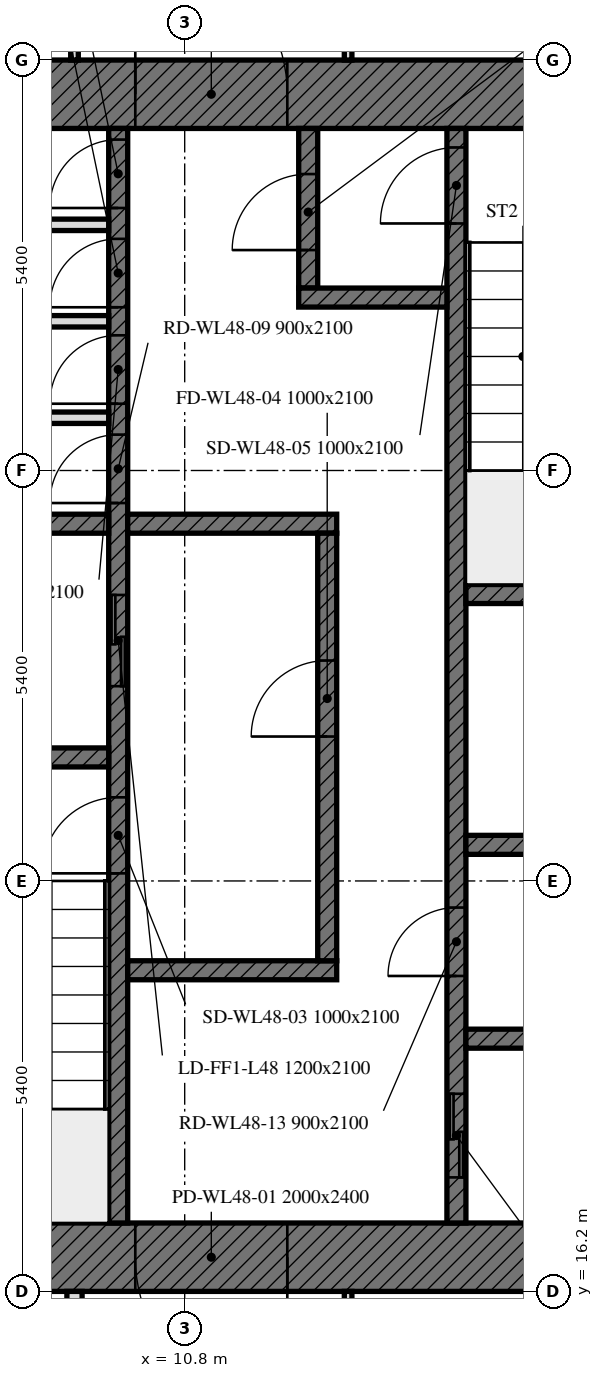
"""IFC4 building model, lengths in metres.
Left out: names, types, materials, properties, quantities, classifications, styles, units other than length and angle.
Written with IfcOpenShell. Run it as: python <this file> out.ifc"""

import sys

from ifc_helpers import new_model, si_unit, direction, frame, frame_2d, origin, place, context, subcontext, project, spatial, rectangle, extrude, element, fill, save


model = new_model("IFC4")
c1 = context("Model", 3, precision=1e-05, world=origin(), true_north=direction((0.0, 1.0)))
c2 = subcontext(c1, "Body", "Model", "MODEL_VIEW")
j1 = project(units=[si_unit("LENGTHUNIT", "METRE"), si_unit("PLANEANGLEUNIT", "RADIAN")], contexts=[c1])
p1 = place(None, origin())
s1 = spatial("IfcSite", under=j1, at=p1, CompositionType="ELEMENT")
p2 = place(p1, origin())
s2 = spatial("IfcBuilding", under=s1, at=p2, CompositionType="ELEMENT")
p3 = place(p2, frame((0.0, 0.0, 197.2)))
s3 = spatial("IfcBuildingStorey", under=s2, at=p3, CompositionType="ELEMENT", Elevation=197.2)
p4 = place(p3, frame((17.7, 16.65, 0.0), z_axis=(0.0, 0.0, 1.0), x_axis=(-1.0, 0.0, 0.0)))
e1 = element("IfcWall", 1, at=p4, inside=s3, PredefinedType="SOLIDWALL", context=c2, shape_type="SweptSolid", body=[
    extrude(rectangle(XDim=11.1, YDim=0.9, at=frame_2d((5.55, 0.0))), origin(), (0.0, 0.0, 1.0), 3.0),
])
p5 = place(p4, frame((5.55, 0.0, 0.0)))
e2 = element("IfcOpeningElement", 2, at=p5, cuts=e1, PredefinedType="OPENING", context=c2, shape_type="SweptSolid", body=[
    extrude(rectangle(XDim=2.0, YDim=2.4, at=frame_2d((1.0, 1.2))), frame((0.0, 0.45, 0.0), z_axis=(0.0, -1.0, 0.0), x_axis=(1.0, 0.0, 0.0)), (0.0, 0.0, 1.0), 0.9),
])
p6 = place(p3, frame((6.6, 31.95, 0.0), z_axis=(0.0, 0.0, 1.0), x_axis=(1.0, 0.0, 0.0)))
e3 = element("IfcWall", 3, at=p6, inside=s3, PredefinedType="SOLIDWALL", context=c2, shape_type="SweptSolid", body=[
    extrude(rectangle(XDim=11.1, YDim=0.9, at=frame_2d((5.55, 0.0))), origin(), (0.0, 0.0, 1.0), 3.0),
])
p7 = place(p6, frame((3.55, 0.0, 0.0)))
e4 = element("IfcOpeningElement", 4, at=p7, cuts=e3, PredefinedType="OPENING", context=c2, shape_type="SweptSolid", body=[
    extrude(rectangle(XDim=2.0, YDim=2.4, at=frame_2d((1.0, 1.2))), frame((0.0, 0.45, 0.0), z_axis=(0.0, -1.0, 0.0), x_axis=(1.0, 0.0, 0.0)), (0.0, 0.0, 1.0), 0.9),
])
p8 = place(p3, frame((9.925, 17.1, 0.0), z_axis=(0.0, 0.0, 1.0), x_axis=(0.0, 1.0, 0.0)))
e5 = element("IfcWall", 5, at=p8, inside=s3, PredefinedType="SOLIDWALL", context=c2, shape_type="SweptSolid", body=[
    extrude(rectangle(XDim=14.4, YDim=0.25, at=frame_2d((7.2, 0.0))), origin(), (0.0, 0.0, 1.0), 3.0),
])
p9 = place(p8, frame((4.6, 0.0, 0.0)))
e6 = element("IfcOpeningElement", 6, at=p9, cuts=e5, PredefinedType="OPENING", context=c2, shape_type="SweptSolid", body=[
    extrude(rectangle(XDim=1.0, YDim=2.1, at=frame_2d((0.5, 1.05))), frame((0.0, 0.125, 0.0), z_axis=(0.0, -1.0, 0.0), x_axis=(1.0, 0.0, 0.0)), (0.0, 0.0, 1.0), 0.25),
])
p10 = place(p8, frame((7.062, 0.0, 0.0)))
e7 = element("IfcOpeningElement", 7, at=p10, cuts=e5, PredefinedType="OPENING", context=c2, shape_type="SweptSolid", body=[
    extrude(rectangle(XDim=1.2, YDim=2.1, at=frame_2d((0.6, 1.05))), frame((0.0, 0.125, 0.0), z_axis=(0.0, -1.0, 0.0), x_axis=(1.0, 0.0, 0.0)), (0.0, 0.0, 1.0), 0.25),
])
p11 = place(p8, frame((9.472, 0.0, 0.0)))
e8 = element("IfcOpeningElement", 8, at=p11, cuts=e5, PredefinedType="OPENING", context=c2, shape_type="SweptSolid", body=[
    extrude(rectangle(XDim=0.9, YDim=2.1, at=frame_2d((0.45, 1.05))), frame((0.0, 0.125, 0.0), z_axis=(0.0, -1.0, 0.0), x_axis=(1.0, 0.0, 0.0)), (0.0, 0.0, 1.0), 0.25),
])
p12 = place(p8, frame((10.779, 0.0, 0.0)))
e9 = element("IfcOpeningElement", 9, at=p12, cuts=e5, PredefinedType="OPENING", context=c2, shape_type="SweptSolid", body=[
    extrude(rectangle(XDim=0.9, YDim=2.1, at=frame_2d((0.45, 1.05))), frame((0.0, 0.125, 0.0), z_axis=(0.0, -1.0, 0.0), x_axis=(1.0, 0.0, 0.0)), (0.0, 0.0, 1.0), 0.25),
])
p13 = place(p8, frame((12.048, 0.0, 0.0)))
e10 = element("IfcOpeningElement", 10, at=p13, cuts=e5, PredefinedType="OPENING", context=c2, shape_type="SweptSolid", body=[
    extrude(rectangle(XDim=0.9, YDim=2.1, at=frame_2d((0.45, 1.05))), frame((0.0, 0.125, 0.0), z_axis=(0.0, -1.0, 0.0), x_axis=(1.0, 0.0, 0.0)), (0.0, 0.0, 1.0), 0.25),
])
p14 = place(p8, frame((13.354, 0.0, 0.0)))
e11 = element("IfcOpeningElement", 11, at=p14, cuts=e5, PredefinedType="OPENING", context=c2, shape_type="SweptSolid", body=[
    extrude(rectangle(XDim=0.9, YDim=2.1, at=frame_2d((0.45, 1.05))), frame((0.0, 0.125, 0.0), z_axis=(0.0, -1.0, 0.0), x_axis=(1.0, 0.0, 0.0)), (0.0, 0.0, 1.0), 0.25),
])
p15 = place(p3, frame((14.375, 17.1, 0.0), z_axis=(0.0, 0.0, 1.0), x_axis=(0.0, 1.0, 0.0)))
e12 = element("IfcWall", 12, at=p15, inside=s3, PredefinedType="SOLIDWALL", context=c2, shape_type="SweptSolid", body=[
    extrude(rectangle(XDim=14.4, YDim=0.25, at=frame_2d((7.2, 0.0))), origin(), (0.0, 0.0, 1.0), 3.0),
])
p16 = place(p15, frame((13.15, 0.0, 0.0)))
e13 = element("IfcOpeningElement", 13, at=p16, cuts=e12, PredefinedType="OPENING", context=c2, shape_type="SweptSolid", body=[
    extrude(rectangle(XDim=1.0, YDim=2.1, at=frame_2d((0.5, 1.05))), frame((0.0, 0.125, 0.0), z_axis=(0.0, -1.0, 0.0), x_axis=(1.0, 0.0, 0.0)), (0.0, 0.0, 1.0), 0.25),
])
p17 = place(p15, frame((0.6, 0.0, 0.0)))
e14 = element("IfcOpeningElement", 14, at=p17, cuts=e12, PredefinedType="OPENING", context=c2, shape_type="SweptSolid", body=[
    extrude(rectangle(XDim=1.1, YDim=2.1, at=frame_2d((0.55, 1.05))), frame((0.0, 0.125, 0.0), z_axis=(0.0, -1.0, 0.0), x_axis=(1.0, 0.0, 0.0)), (0.0, 0.0, 1.0), 0.25),
])
p18 = place(p15, frame((3.25, 0.0, 0.0)))
e15 = element("IfcOpeningElement", 15, at=p18, cuts=e12, PredefinedType="OPENING", context=c2, shape_type="SweptSolid", body=[
    extrude(rectangle(XDim=0.9, YDim=2.1, at=frame_2d((0.45, 1.05))), frame((0.0, 0.125, 0.0), z_axis=(0.0, -1.0, 0.0), x_axis=(1.0, 0.0, 0.0)), (0.0, 0.0, 1.0), 0.25),
])
for number, where, z_axis, x_axis in (
    (16, (6.6, 23.225, 0.0), (0.0, 0.0, 1.0), (1.0, 0.0, 0.0)),
    (17, (14.5, 25.375, 0.0), (0.0, 0.0, 1.0), (1.0, 0.0, 0.0)),
    (18, (14.5, 22.075, 0.0), (0.0, 0.0, 1.0), (1.0, 0.0, 0.0)),
    (19, (6.6, 26.3, 0.0), (0.0, 0.0, 1.0), (1.0, 0.0, 0.0)),
):
    element("IfcWall", number, at=place(p3, frame(where, z_axis=z_axis, x_axis=x_axis)), inside=s3, PredefinedType="SOLIDWALL", context=c2, shape_type="SweptSolid", body=[
        extrude(rectangle(XDim=3.2, YDim=0.25, at=frame_2d((1.6, 0.0))), origin(), (0.0, 0.0, 1.0), 3.0),
    ])
for number, where, z_axis, x_axis in (
    (20, (10.05, 26.3, 0.0), (0.0, 0.0, 1.0), (1.0, 0.0, 0.0)),
    (21, (10.05, 20.425, 0.0), (0.0, 0.0, 1.0), (1.0, 0.0, 0.0)),
):
    element("IfcWall", number, at=place(p3, frame(where, z_axis=z_axis, x_axis=x_axis)), inside=s3, PredefinedType="SOLIDWALL", context=c2, shape_type="SweptSolid", body=[
        extrude(rectangle(XDim=2.75, YDim=0.25, at=frame_2d((1.375, 0.0))), origin(), (0.0, 0.0, 1.0), 3.0),
    ])
p19 = place(p3, frame((12.425, 29.4, 0.0), z_axis=(0.0, 0.0, 1.0), x_axis=(0.0, 1.0, 0.0)))
e22 = element("IfcWall", 22, at=p19, inside=s3, PredefinedType="SOLIDWALL", context=c2, shape_type="SweptSolid", body=[
    extrude(rectangle(XDim=2.1, YDim=0.25, at=frame_2d((1.05, 0.0))), origin(), (0.0, 0.0, 1.0), 3.0),
])
p20 = place(p19, frame((0.5, 0.0, 0.0)))
e23 = element("IfcOpeningElement", 23, at=p20, cuts=e22, PredefinedType="OPENING", context=c2, shape_type="SweptSolid", body=[
    extrude(rectangle(XDim=1.0, YDim=2.1, at=frame_2d((0.5, 1.05))), frame((0.0, 0.125, 0.0), z_axis=(0.0, -1.0, 0.0), x_axis=(1.0, 0.0, 0.0)), (0.0, 0.0, 1.0), 0.25),
])
p21 = place(p3, frame((12.3, 29.275, 0.0), z_axis=(0.0, 0.0, 1.0), x_axis=(1.0, 0.0, 0.0)))
e24 = element("IfcWall", 24, at=p21, inside=s3, PredefinedType="SOLIDWALL", context=c2, shape_type="SweptSolid", body=[
    extrude(rectangle(XDim=1.95, YDim=0.25, at=frame_2d((0.975, 0.0))), origin(), (0.0, 0.0, 1.0), 3.0),
])
p22 = place(p3, frame((12.675, 20.55, 0.0), z_axis=(0.0, 0.0, 1.0), x_axis=(0.0, 1.0, 0.0)))
e25 = element("IfcWall", 25, at=p22, inside=s3, PredefinedType="SOLIDWALL", context=c2, shape_type="SweptSolid", body=[
    extrude(rectangle(XDim=5.625, YDim=0.25, at=frame_2d((2.812, 0.0))), origin(), (0.0, 0.0, 1.0), 3.0),
])
p23 = place(p22, frame((2.95, 0.0, 0.0)))
e26 = element("IfcOpeningElement", 26, at=p23, cuts=e25, PredefinedType="OPENING", context=c2, shape_type="SweptSolid", body=[
    extrude(rectangle(XDim=1.0, YDim=2.1, at=frame_2d((0.5, 1.05))), frame((0.0, 0.125, 0.0), z_axis=(0.0, -1.0, 0.0), x_axis=(1.0, 0.0, 0.0)), (0.0, 0.0, 1.0), 0.25),
])
p24 = place(p3, frame((14.5, 19.525, 0.0), z_axis=(0.0, 0.0, 1.0), x_axis=(1.0, 0.0, 0.0)))
e27 = element("IfcWall", 27, at=p24, inside=s3, PredefinedType="SOLIDWALL", context=c2, shape_type="SweptSolid", body=[
    extrude(rectangle(XDim=3.2, YDim=0.25, at=frame_2d((1.6, 0.0))), origin(), (0.0, 0.0, 1.0), 3.0),
])
for number, where, z_axis, x_axis in (
    (28, (6.6, 27.694, 0.0), (0.0, 0.0, 1.0), (1.0, 0.0, 0.0)),
    (29, (6.6, 28.963, 0.0), (0.0, 0.0, 1.0), (1.0, 0.0, 0.0)),
    (30, (6.6, 30.232, 0.0), (0.0, 0.0, 1.0), (1.0, 0.0, 0.0)),
):
    element("IfcWall", number, at=place(p3, frame(where, z_axis=z_axis, x_axis=x_axis)), inside=s3, PredefinedType="PARTITIONING", context=c2, shape_type="SweptSolid", body=[
        extrude(rectangle(XDim=3.2, YDim=0.15, at=frame_2d((1.6, 0.0))), origin(), (0.0, 0.0, 1.0), 3.0),
    ])
for number, where, z_axis, x_axis in (
    (31, (9.35, 39.525, 0.0), (0.0, 0.0, 1.0), (0.0, -1.0, 0.0)),
    (32, (12.95, 32.4, 0.0), (0.0, 0.0, 1.0), (0.0, 1.0, 0.0)),
):
    element("IfcWall", number, at=place(p3, frame(where, z_axis=z_axis, x_axis=x_axis)), inside=s3, PredefinedType="PARTITIONING", context=c2, shape_type="SweptSolid", body=[
        extrude(rectangle(XDim=7.125, YDim=0.1, at=frame_2d((3.562, 0.0))), origin(), (0.0, 0.0, 1.0), 3.0),
    ])
p25 = place(p3, frame((9.35, 16.2, 0.0), z_axis=(0.0, 0.0, 1.0), x_axis=(0.0, -1.0, 0.0)))
e33 = element("IfcWall", 33, at=p25, inside=s3, PredefinedType="PARTITIONING", context=c2, shape_type="SweptSolid", body=[
    extrude(rectangle(XDim=2.8, YDim=0.2, at=frame_2d((1.4, 0.0))), origin(), (0.0, 0.0, 1.0), 3.0),
])
p26 = place(p3, frame((12.95, 13.575, 0.0), z_axis=(0.0, 0.0, 1.0), x_axis=(0.0, 1.0, 0.0)))
e34 = element("IfcWall", 34, at=p26, inside=s3, PredefinedType="PARTITIONING", context=c2, shape_type="SweptSolid", body=[
    extrude(rectangle(XDim=2.625, YDim=0.1, at=frame_2d((1.312, 0.0))), origin(), (0.0, 0.0, 1.0), 3.0),
])
p27 = place(p5, origin())
e35 = element("IfcDoor", 35, at=p27, inside=s3, OperationType="DOUBLE_DOOR_SINGLE_SWING", PredefinedType="DOOR", context=c2, shape_type="SweptSolid", body=[
    extrude(rectangle(XDim=2.0, YDim=2.4, at=frame_2d((1.0, 1.2))), frame((0.0, 0.025, 0.0), z_axis=(0.0, -1.0, 0.0), x_axis=(1.0, 0.0, 0.0)), (0.0, 0.0, 1.0), 0.05),
])
fill(e2, e35)
p28 = place(p7, origin())
e36 = element("IfcDoor", 36, at=p28, inside=s3, OperationType="DOUBLE_DOOR_SINGLE_SWING", PredefinedType="DOOR", context=c2, shape_type="SweptSolid", body=[
    extrude(rectangle(XDim=2.0, YDim=2.4, at=frame_2d((1.0, 1.2))), frame((0.0, 0.025, 0.0), z_axis=(0.0, -1.0, 0.0), x_axis=(1.0, 0.0, 0.0)), (0.0, 0.0, 1.0), 0.05),
])
fill(e4, e36)
p29 = place(p9, origin())
e37 = element("IfcDoor", 37, at=p29, inside=s3, OperationType="SINGLE_SWING_LEFT", PredefinedType="DOOR", context=c2, shape_type="SweptSolid", body=[
    extrude(rectangle(XDim=1.0, YDim=2.1, at=frame_2d((0.5, 1.05))), frame((0.0, 0.025, 0.0), z_axis=(0.0, -1.0, 0.0), x_axis=(1.0, 0.0, 0.0)), (0.0, 0.0, 1.0), 0.05),
])
fill(e6, e37)
p30 = place(p23, origin())
e38 = element("IfcDoor", 38, at=p30, inside=s3, OperationType="SINGLE_SWING_LEFT", PredefinedType="DOOR", context=c2, shape_type="SweptSolid", body=[
    extrude(rectangle(XDim=1.0, YDim=2.1, at=frame_2d((0.5, 1.05))), frame((0.0, 0.025, 0.0), z_axis=(0.0, -1.0, 0.0), x_axis=(1.0, 0.0, 0.0)), (0.0, 0.0, 1.0), 0.05),
])
fill(e26, e38)
p31 = place(p16, origin())
e39 = element("IfcDoor", 39, at=p31, inside=s3, OperationType="SINGLE_SWING_LEFT", PredefinedType="DOOR", context=c2, shape_type="SweptSolid", body=[
    extrude(rectangle(XDim=1.0, YDim=2.1, at=frame_2d((0.5, 1.05))), frame((0.0, 0.025, 0.0), z_axis=(0.0, -1.0, 0.0), x_axis=(1.0, 0.0, 0.0)), (0.0, 0.0, 1.0), 0.05),
])
fill(e13, e39)
p32 = place(p20, origin())
e40 = element("IfcDoor", 40, at=p32, inside=s3, OperationType="SINGLE_SWING_LEFT", PredefinedType="DOOR", context=c2, shape_type="SweptSolid", body=[
    extrude(rectangle(XDim=1.0, YDim=2.1, at=frame_2d((0.5, 1.05))), frame((0.0, 0.025, 0.0), z_axis=(0.0, -1.0, 0.0), x_axis=(1.0, 0.0, 0.0)), (0.0, 0.0, 1.0), 0.05),
])
fill(e23, e40)
p33 = place(p10, origin())
e41 = element("IfcDoor", 41, at=p33, inside=s3, OperationType="DOUBLE_DOOR_SLIDING", PredefinedType="DOOR", context=c2, shape_type="SweptSolid", body=[
    extrude(rectangle(XDim=1.2, YDim=2.1, at=frame_2d((0.6, 1.05))), frame((0.0, 0.025, 0.0), z_axis=(0.0, -1.0, 0.0), x_axis=(1.0, 0.0, 0.0)), (0.0, 0.0, 1.0), 0.05),
])
fill(e7, e41)
p34 = place(p17, origin())
e42 = element("IfcDoor", 42, at=p34, inside=s3, OperationType="DOUBLE_DOOR_SLIDING", PredefinedType="DOOR", context=c2, shape_type="SweptSolid", body=[
    extrude(rectangle(XDim=1.1, YDim=2.1, at=frame_2d((0.55, 1.05))), frame((0.0, 0.025, 0.0), z_axis=(0.0, -1.0, 0.0), x_axis=(1.0, 0.0, 0.0)), (0.0, 0.0, 1.0), 0.05),
])
fill(e14, e42)
p35 = place(p11, origin())
e43 = element("IfcDoor", 43, at=p35, inside=s3, OperationType="SINGLE_SWING_LEFT", PredefinedType="DOOR", context=c2, shape_type="SweptSolid", body=[
    extrude(rectangle(XDim=0.9, YDim=2.1, at=frame_2d((0.45, 1.05))), frame((0.0, 0.025, 0.0), z_axis=(0.0, -1.0, 0.0), x_axis=(1.0, 0.0, 0.0)), (0.0, 0.0, 1.0), 0.05),
])
fill(e8, e43)
p36 = place(p12, origin())
e44 = element("IfcDoor", 44, at=p36, inside=s3, OperationType="SINGLE_SWING_LEFT", PredefinedType="DOOR", context=c2, shape_type="SweptSolid", body=[
    extrude(rectangle(XDim=0.9, YDim=2.1, at=frame_2d((0.45, 1.05))), frame((0.0, 0.025, 0.0), z_axis=(0.0, -1.0, 0.0), x_axis=(1.0, 0.0, 0.0)), (0.0, 0.0, 1.0), 0.05),
])
fill(e9, e44)
p37 = place(p13, origin())
e45 = element("IfcDoor", 45, at=p37, inside=s3, OperationType="SINGLE_SWING_LEFT", PredefinedType="DOOR", context=c2, shape_type="SweptSolid", body=[
    extrude(rectangle(XDim=0.9, YDim=2.1, at=frame_2d((0.45, 1.05))), frame((0.0, 0.025, 0.0), z_axis=(0.0, -1.0, 0.0), x_axis=(1.0, 0.0, 0.0)), (0.0, 0.0, 1.0), 0.05),
])
fill(e10, e45)
p38 = place(p14, origin())
e46 = element("IfcDoor", 46, at=p38, inside=s3, OperationType="SINGLE_SWING_LEFT", PredefinedType="DOOR", context=c2, shape_type="SweptSolid", body=[
    extrude(rectangle(XDim=0.9, YDim=2.1, at=frame_2d((0.45, 1.05))), frame((0.0, 0.025, 0.0), z_axis=(0.0, -1.0, 0.0), x_axis=(1.0, 0.0, 0.0)), (0.0, 0.0, 1.0), 0.05),
])
fill(e11, e46)
p39 = place(p18, origin())
e47 = element("IfcDoor", 47, at=p39, inside=s3, OperationType="SINGLE_SWING_LEFT", PredefinedType="DOOR", context=c2, shape_type="SweptSolid", body=[
    extrude(rectangle(XDim=0.9, YDim=2.1, at=frame_2d((0.45, 1.05))), frame((0.0, 0.025, 0.0), z_axis=(0.0, -1.0, 0.0), x_axis=(1.0, 0.0, 0.0)), (0.0, 0.0, 1.0), 0.05),
])
fill(e15, e47)
save(model, sys.argv[1])
